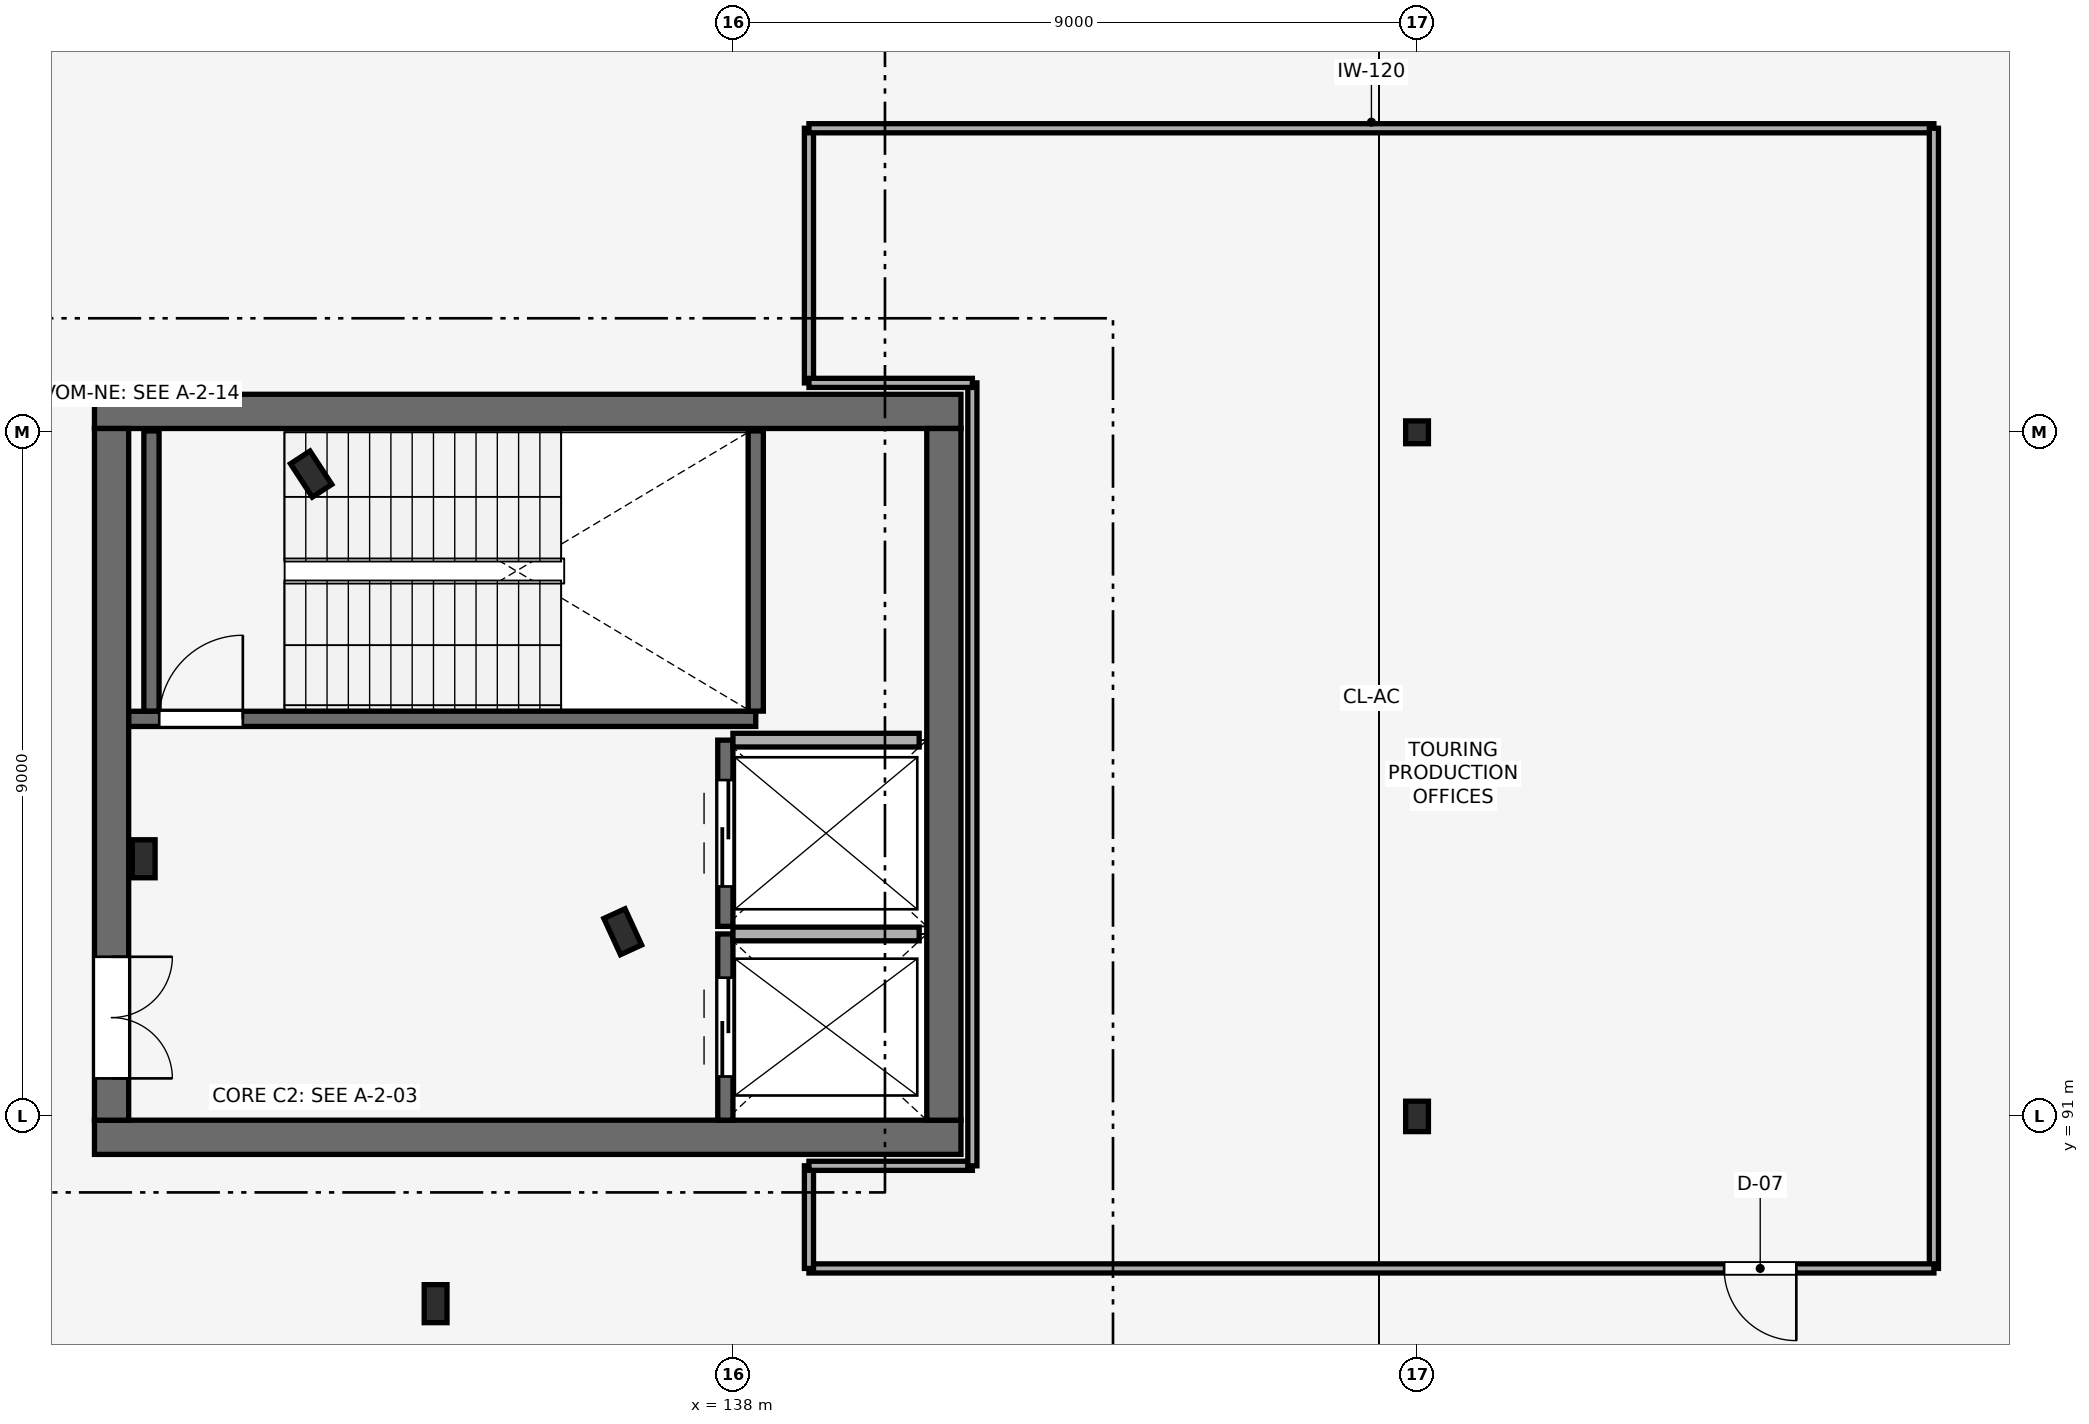
"""IFC4 building model, lengths in metres.
Left out: names, types, materials, properties, quantities, classifications, styles, units other than length and angle.
Written with IfcOpenShell. Run it as: python <this file> out.ifc"""

import sys

from ifc_helpers import new_model, si_unit, direction, frame, frame_2d, origin, origin_2d, place, context, subcontext, project, spatial, rectangle, hollow_rectangle, i_section, extrude, element, fill, save


model = new_model("IFC4")
c1 = context("Model", 3, precision=1e-05, world=origin(), true_north=direction((0.0, 1.0)))
c2 = subcontext(c1, "Body", "Model", "MODEL_VIEW")
j1 = project(units=[si_unit("LENGTHUNIT", "METRE"), si_unit("PLANEANGLEUNIT", "RADIAN")], contexts=[c1])
p1 = place(None, origin())
s1 = spatial("IfcSite", under=j1, at=p1, CompositionType="ELEMENT")
p2 = place(p1, origin())
s2 = spatial("IfcBuilding", under=s1, at=p2, CompositionType="ELEMENT")
p3 = place(p2, frame((0.0, 0.0, 5.4)))
s3 = spatial("IfcBuildingStorey", under=s2, at=p3, CompositionType="ELEMENT", Elevation=5.4)
for number, where, z_axis, x_axis in (
    (1, (136.55, 93.43, 0.0), (0.0, 0.0, 1.0), (0.909, 0.417, 0.0)),
    (2, (132.451, 99.45, 0.0), (0.0, 0.0, 1.0), (0.837, 0.547, 0.0)),
):
    element("IfcColumn", number, at=place(p3, frame(where, z_axis=z_axis, x_axis=x_axis)), inside=s3, PredefinedType="COLUMN", context=c2, shape_type="SweptSolid", body=[
        extrude(i_section(OverallWidth=0.306, OverallDepth=0.524, WebThickness=0.021, FlangeThickness=0.04, FilletRadius=0.027, at=origin_2d()), origin(), (0.0, 0.0, 1.0), 4.8),
    ])
p4 = place(p3, frame((134.088, 88.537, 0.0), z_axis=(0.0, 0.0, 1.0), x_axis=(1.0, 0.0, 0.0)))
e3 = element("IfcColumn", 3, at=p4, inside=s3, PredefinedType="COLUMN", context=c2, shape_type="SweptSolid", body=[
    extrude(i_section(OverallWidth=0.3, OverallDepth=0.5, WebThickness=0.014, FlangeThickness=0.028, FilletRadius=0.027, at=origin_2d()), origin(), (0.0, 0.0, 1.0), 4.8),
])
p5 = place(p3, frame((147.0, 91.0, 0.0), z_axis=(0.0, 0.0, 1.0), x_axis=(1.0, 0.0, 0.0)))
e4 = element("IfcColumn", 4, at=p5, inside=s3, PredefinedType="COLUMN", context=c2, shape_type="SweptSolid", body=[
    extrude(i_section(OverallWidth=0.3, OverallDepth=0.4, WebThickness=0.013, FlangeThickness=0.024, FilletRadius=0.027, at=origin_2d()), origin(), (0.0, 0.0, 1.0), 4.8),
])
p6 = place(p3, frame((147.0, 100.0, 0.0), z_axis=(0.0, 0.0, 1.0), x_axis=(1.0, 0.0, 0.0)))
e5 = element("IfcColumn", 5, at=p6, inside=s3, PredefinedType="COLUMN", context=c2, shape_type="SweptSolid", body=[
    extrude(hollow_rectangle(XDim=0.3, YDim=0.3, WallThickness=0.012, at=origin_2d()), origin(), (0.0, 0.0, 1.0), 4.8),
])
for number, where, z_axis, x_axis in (
    (6, (129.6, 90.725, 0.0), (0.0, 0.0, 1.0), (1.0, 0.0, 0.0)),
    (7, (129.6, 100.275, 0.0), (0.0, 0.0, 1.0), (1.0, 0.0, 0.0)),
):
    element("IfcWall", number, at=place(p3, frame(where, z_axis=z_axis, x_axis=x_axis)), inside=s3, PredefinedType="SHEAR", context=c2, shape_type="SweptSolid", body=[
        extrude(rectangle(XDim=11.4, YDim=0.45, at=frame_2d((5.7, 0.0))), origin(), (0.0, 0.0, 1.0), 4.8),
    ])
p7 = place(p3, frame((129.825, 90.95, 0.0), z_axis=(0.0, 0.0, 1.0), x_axis=(0.0, 1.0, 0.0)))
e8 = element("IfcWall", 8, at=p7, inside=s3, PredefinedType="SHEAR", context=c2, shape_type="SweptSolid", body=[
    extrude(rectangle(XDim=9.1, YDim=0.45, at=frame_2d((4.55, 0.0))), origin(), (0.0, 0.0, 1.0), 4.8),
])
p8 = place(p7, frame((0.55, 0.0, 0.0)))
e9 = element("IfcOpeningElement", 9, at=p8, cuts=e8, PredefinedType="OPENING", context=c2, shape_type="SweptSolid", body=[
    extrude(rectangle(XDim=1.6, YDim=2.2, at=frame_2d((0.8, 1.1))), frame((0.0, 0.235, 0.0), z_axis=(0.0, -1.0, 0.0), x_axis=(1.0, 0.0, 0.0)), (0.0, 0.0, 1.0), 0.47),
])
p9 = place(p3, frame((140.775, 90.95, 0.0), z_axis=(0.0, 0.0, 1.0), x_axis=(0.0, 1.0, 0.0)))
e10 = element("IfcWall", 10, at=p9, inside=s3, PredefinedType="SHEAR", context=c2, shape_type="SweptSolid", body=[
    extrude(rectangle(XDim=9.1, YDim=0.45, at=frame_2d((4.55, 0.0))), origin(), (0.0, 0.0, 1.0), 4.8),
])
p10 = place(p3, frame((130.248, 94.389, 0.0), z_axis=(0.0, 0.0, 1.0), x_axis=(1.0, 0.0, 0.0)))
e11 = element("IfcColumn", 11, at=p10, inside=s3, PredefinedType="COLUMN", context=c2, shape_type="SweptSolid", body=[
    extrude(i_section(OverallWidth=0.3, OverallDepth=0.5, WebThickness=0.014, FlangeThickness=0.028, FilletRadius=0.027, at=origin_2d()), origin(), (0.0, 0.0, 1.0), 4.8),
])
p11 = place(p3, frame((137.9, 90.95, 0.0), z_axis=(0.0, 0.0, 1.0), x_axis=(0.0, 1.0, 0.0)))
e12 = element("IfcWall", 12, at=p11, inside=s3, PredefinedType="SHEAR", context=c2, shape_type="SweptSolid", body=[
    extrude(rectangle(XDim=2.45, YDim=0.2, at=frame_2d((1.225, 0.0))), origin(), (0.0, 0.0, 1.0), 4.52),
])
p12 = place(p11, frame((0.575, 0.0, 0.0)))
e13 = element("IfcOpeningElement", 13, at=p12, cuts=e12, PredefinedType="OPENING", context=c2, shape_type="SweptSolid", body=[
    extrude(rectangle(XDim=1.3, YDim=2.2, at=frame_2d((0.65, 1.1))), frame((0.0, 0.11, 0.0), z_axis=(0.0, -1.0, 0.0), x_axis=(1.0, 0.0, 0.0)), (0.0, 0.0, 1.0), 0.22),
])
p13 = place(p3, frame((138.0, 93.4, 0.0), z_axis=(0.0, 0.0, 1.0), x_axis=(1.0, 0.0, 0.0)))
e14 = element("IfcWall", 14, at=p13, inside=s3, PredefinedType="PARTITIONING", context=c2, shape_type="SweptSolid", body=[
    extrude(rectangle(XDim=2.45, YDim=0.18, at=frame_2d((1.225, 0.0))), origin(), (0.0, 0.0, 1.0), 4.8),
])
p14 = place(p3, frame((137.9, 93.5, 0.0), z_axis=(0.0, 0.0, 1.0), x_axis=(0.0, 1.0, 0.0)))
e15 = element("IfcWall", 15, at=p14, inside=s3, PredefinedType="SHEAR", context=c2, shape_type="SweptSolid", body=[
    extrude(rectangle(XDim=2.45, YDim=0.2, at=frame_2d((1.225, 0.0))), origin(), (0.0, 0.0, 1.0), 4.52),
])
p15 = place(p14, frame((0.525, 0.0, 0.0)))
e16 = element("IfcOpeningElement", 16, at=p15, cuts=e15, PredefinedType="OPENING", context=c2, shape_type="SweptSolid", body=[
    extrude(rectangle(XDim=1.4, YDim=2.2, at=frame_2d((0.7, 1.1))), frame((0.0, 0.11, 0.0), z_axis=(0.0, -1.0, 0.0), x_axis=(1.0, 0.0, 0.0)), (0.0, 0.0, 1.0), 0.22),
])
p16 = place(p3, frame((138.0, 95.95, 0.0), z_axis=(0.0, 0.0, 1.0), x_axis=(1.0, 0.0, 0.0)))
e17 = element("IfcWall", 17, at=p16, inside=s3, PredefinedType="PARTITIONING", context=c2, shape_type="SweptSolid", body=[
    extrude(rectangle(XDim=2.45, YDim=0.18, at=frame_2d((1.225, 0.0))), origin(), (0.0, 0.0, 1.0), 4.8),
])
p17 = place(p3, frame((130.052, 96.23, 0.0), z_axis=(0.0, 0.0, 1.0), x_axis=(1.0, 0.0, 0.0)))
e18 = element("IfcWall", 18, at=p17, inside=s3, PredefinedType="SHEAR", context=c2, shape_type="SweptSolid", body=[
    extrude(rectangle(XDim=8.248, YDim=0.2, at=frame_2d((4.124, 0.0))), origin(), (0.0, 0.0, 1.0), 4.8),
])
p18 = place(p17, frame((0.4, 0.0, 0.0)))
e19 = element("IfcOpeningElement", 19, at=p18, cuts=e18, PredefinedType="OPENING", context=c2, shape_type="SweptSolid", body=[
    extrude(rectangle(XDim=1.1, YDim=2.15, at=frame_2d((0.55, 1.075))), frame((0.0, 0.11, 0.0), z_axis=(0.0, -1.0, 0.0), x_axis=(1.0, 0.0, 0.0)), (0.0, 0.0, 1.0), 0.22),
])
for number, where, z_axis, x_axis in (
    (20, (130.35, 96.332, 0.0), (0.0, 0.0, 1.0), (0.0, 1.0, 0.0)),
    (21, (138.3, 96.332, 0.0), (0.0, 0.0, 1.0), (0.0, 1.0, 0.0)),
):
    element("IfcWall", number, at=place(p3, frame(where, z_axis=z_axis, x_axis=x_axis)), inside=s3, PredefinedType="SHEAR", context=c2, shape_type="SweptSolid", body=[
        extrude(rectangle(XDim=3.686, YDim=0.2, at=frame_2d((1.843, 0.0))), origin(), (0.0, 0.0, 1.0), 4.8),
    ])
p19 = place(p3, frame((139.0, 100.65, 0.0), z_axis=(0.0, 0.0, 1.0), x_axis=(0.0, 1.0, 0.0)))
e22 = element("IfcWall", 22, at=p19, inside=s3, PredefinedType="PARTITIONING", context=c2, shape_type="SweptSolid", body=[
    extrude(rectangle(XDim=3.35, YDim=0.12, at=frame_2d((1.675, 0.0))), origin(), (0.0, 0.0, 1.0), 4.52),
])
p20 = place(p3, frame((139.0, 104.0, 0.0), z_axis=(0.0, 0.0, 1.0), x_axis=(1.0, 0.0, 0.0)))
e23 = element("IfcWall", 23, at=p20, inside=s3, PredefinedType="PARTITIONING", context=c2, shape_type="SweptSolid", body=[
    extrude(rectangle(XDim=14.8, YDim=0.12, at=frame_2d((7.4, 0.0))), origin(), (0.0, 0.0, 1.0), 4.52),
])
p21 = place(p3, frame((153.8, 104.0, 0.0), z_axis=(0.0, 0.0, 1.0), x_axis=(0.0, -1.0, 0.0)))
e24 = element("IfcWall", 24, at=p21, inside=s3, PredefinedType="PARTITIONING", context=c2, shape_type="SweptSolid", body=[
    extrude(rectangle(XDim=15.0, YDim=0.12, at=frame_2d((7.5, 0.0))), origin(), (0.0, 0.0, 1.0), 4.52),
])
p22 = place(p3, frame((153.8, 89.0, 0.0), z_axis=(0.0, 0.0, 1.0), x_axis=(-1.0, 0.0, 0.0)))
e25 = element("IfcWall", 25, at=p22, inside=s3, PredefinedType="PARTITIONING", context=c2, shape_type="SweptSolid", body=[
    extrude(rectangle(XDim=14.8, YDim=0.12, at=frame_2d((7.4, 0.0))), origin(), (0.0, 0.0, 1.0), 4.52),
])
p23 = place(p22, frame((1.81, 0.0, 0.0)))
e26 = element("IfcOpeningElement", 26, at=p23, cuts=e25, PredefinedType="OPENING", context=c2, shape_type="SweptSolid", body=[
    extrude(rectangle(XDim=0.95, YDim=2.1, at=frame_2d((0.475, 1.05))), frame((0.0, 0.07, 0.0), z_axis=(0.0, -1.0, 0.0), x_axis=(1.0, 0.0, 0.0)), (0.0, 0.0, 1.0), 0.14),
])
p24 = place(p3, frame((139.0, 89.0, 0.0), z_axis=(0.0, 0.0, 1.0), x_axis=(0.0, 1.0, 0.0)))
e27 = element("IfcWall", 27, at=p24, inside=s3, PredefinedType="PARTITIONING", context=c2, shape_type="SweptSolid", body=[
    extrude(rectangle(XDim=1.35, YDim=0.12, at=frame_2d((0.675, 0.0))), origin(), (0.0, 0.0, 1.0), 4.52),
])
p25 = place(p3, frame((139.0, 90.35, 0.0), z_axis=(0.0, 0.0, 1.0), x_axis=(1.0, 0.0, 0.0)))
e28 = element("IfcWall", 28, at=p25, inside=s3, PredefinedType="PARTITIONING", context=c2, shape_type="SweptSolid", body=[
    extrude(rectangle(XDim=2.15, YDim=0.12, at=frame_2d((1.075, 0.0))), origin(), (0.0, 0.0, 1.0), 4.52),
])
p26 = place(p3, frame((141.15, 90.35, 0.0), z_axis=(0.0, 0.0, 1.0), x_axis=(0.0, 1.0, 0.0)))
e29 = element("IfcWall", 29, at=p26, inside=s3, PredefinedType="PARTITIONING", context=c2, shape_type="SweptSolid", body=[
    extrude(rectangle(XDim=10.3, YDim=0.12, at=frame_2d((5.15, 0.0))), origin(), (0.0, 0.0, 1.0), 4.52),
])
p27 = place(p3, frame((141.15, 100.65, 0.0), z_axis=(0.0, 0.0, 1.0), x_axis=(-1.0, 0.0, 0.0)))
e30 = element("IfcWall", 30, at=p27, inside=s3, PredefinedType="PARTITIONING", context=c2, shape_type="SweptSolid", body=[
    extrude(rectangle(XDim=2.15, YDim=0.12, at=frame_2d((1.075, 0.0))), origin(), (0.0, 0.0, 1.0), 4.52),
])
p28 = place(p12, origin())
e31 = element("IfcDoor", 31, at=p28, inside=s3, OperationType="DOUBLE_DOOR_SLIDING", PredefinedType="DOOR", context=c2, shape_type="SweptSolid", body=[
    extrude(rectangle(XDim=1.3, YDim=2.2, at=frame_2d((0.65, 1.1))), frame((0.0, 0.025, 0.0), z_axis=(0.0, -1.0, 0.0), x_axis=(1.0, 0.0, 0.0)), (0.0, 0.0, 1.0), 0.05),
])
fill(e13, e31)
p29 = place(p15, origin())
e32 = element("IfcDoor", 32, at=p29, inside=s3, OperationType="DOUBLE_DOOR_SLIDING", PredefinedType="DOOR", context=c2, shape_type="SweptSolid", body=[
    extrude(rectangle(XDim=1.4, YDim=2.2, at=frame_2d((0.7, 1.1))), frame((0.0, 0.025, 0.0), z_axis=(0.0, -1.0, 0.0), x_axis=(1.0, 0.0, 0.0)), (0.0, 0.0, 1.0), 0.05),
])
fill(e16, e32)
p30 = place(p18, frame((1.1, 0.0, 0.0), z_axis=(0.0, 0.0, 1.0), x_axis=(-1.0, 0.0, 0.0)))
e33 = element("IfcDoor", 33, at=p30, inside=s3, OperationType="SINGLE_SWING_LEFT", PredefinedType="DOOR", context=c2, shape_type="SweptSolid", body=[
    extrude(rectangle(XDim=1.1, YDim=2.15, at=frame_2d((0.55, 1.075))), frame((0.0, 0.025, 0.0), z_axis=(0.0, -1.0, 0.0), x_axis=(1.0, 0.0, 0.0)), (0.0, 0.0, 1.0), 0.05),
])
fill(e19, e33)
p31 = place(p8, frame((1.6, 0.0, 0.0), z_axis=(0.0, 0.0, 1.0), x_axis=(-1.0, 0.0, 0.0)))
e34 = element("IfcDoor", 34, at=p31, inside=s3, OperationType="DOUBLE_DOOR_SINGLE_SWING", PredefinedType="DOOR", context=c2, shape_type="SweptSolid", body=[
    extrude(rectangle(XDim=1.6, YDim=2.2, at=frame_2d((0.8, 1.1))), frame((0.0, 0.025, 0.0), z_axis=(0.0, -1.0, 0.0), x_axis=(1.0, 0.0, 0.0)), (0.0, 0.0, 1.0), 0.05),
])
fill(e9, e34)
p32 = place(p23, origin())
e35 = element("IfcDoor", 35, at=p32, inside=s3, OperationType="SINGLE_SWING_LEFT", PredefinedType="DOOR", context=c2, shape_type="SweptSolid", body=[
    extrude(rectangle(XDim=0.95, YDim=2.1, at=frame_2d((0.475, 1.05))), frame((0.0, 0.025, 0.0), z_axis=(0.0, -1.0, 0.0), x_axis=(1.0, 0.0, 0.0)), (0.0, 0.0, 1.0), 0.05),
])
fill(e26, e35)
save(model, sys.argv[1])
